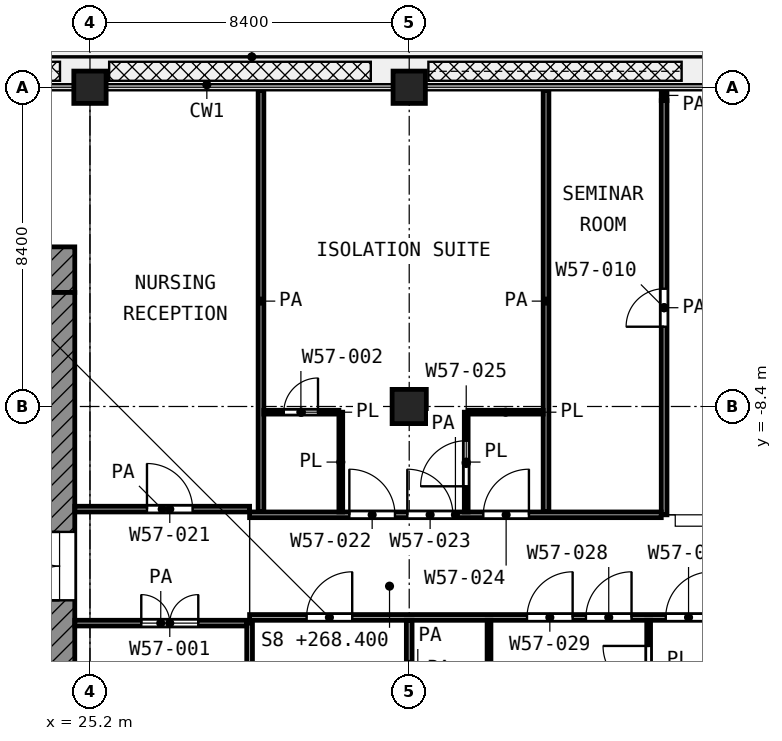
"""IFC4 building model, lengths in metres.
Left out: names, types, materials, properties, quantities, classifications, styles, units other than length and angle.
Written with IfcOpenShell. Run it as: python <this file> out.ifc"""

import sys

from ifc_helpers import new_model, si_unit, direction, frame, frame_2d, origin, origin_2d, place, context, subcontext, project, spatial, rectangle, extrude, element, fill, save


model = new_model("IFC4")
c1 = context("Model", 3, precision=1e-05, world=origin(), true_north=direction((0.0, 1.0)))
c2 = subcontext(c1, "Body", "Model", "MODEL_VIEW")
j1 = project(units=[si_unit("LENGTHUNIT", "METRE"), si_unit("PLANEANGLEUNIT", "RADIAN")], contexts=[c1])
p1 = place(None, origin())
s1 = spatial("IfcSite", under=j1, at=p1, CompositionType="ELEMENT")
p2 = place(p1, origin())
s2 = spatial("IfcBuilding", under=s1, at=p2, CompositionType="ELEMENT")
p3 = place(p2, frame((0.0, 0.0, 268.4)))
s3 = spatial("IfcBuildingStorey", under=s2, at=p3, CompositionType="ELEMENT", Elevation=268.4)
for number, where, z_axis, x_axis in (
    (1, (25.2, 0.0, 0.0), (0.0, 0.0, 1.0), (1.0, 0.0, 0.0)),
    (2, (33.6, 0.0, 0.0), (0.0, 0.0, 1.0), (1.0, 0.0, 0.0)),
):
    element("IfcColumn", number, at=place(p3, frame(where, z_axis=z_axis, x_axis=x_axis)), inside=s3, PredefinedType="COLUMN", context=c2, shape_type="SweptSolid", body=[
        extrude(rectangle(XDim=0.85, YDim=0.85, at=origin_2d()), origin(), (0.0, 0.0, 1.0), 4.2),
    ])
p4 = place(p3, frame((33.6, -8.4, 0.0), z_axis=(0.0, 0.0, 1.0), x_axis=(1.0, 0.0, 0.0)))
e3 = element("IfcColumn", 3, at=p4, inside=s3, PredefinedType="COLUMN", context=c2, shape_type="SweptSolid", body=[
    extrude(rectangle(XDim=0.9, YDim=0.9, at=origin_2d()), origin(), (0.0, 0.0, 1.0), 4.2),
])
p5 = place(p3, frame((4.2, -4.8, 0.0), z_axis=(0.0, 0.0, 1.0), x_axis=(1.0, 0.0, 0.0)))
e4 = element("IfcWall", 4, at=p5, inside=s3, PredefinedType="SHEAR", context=c2, shape_type="SweptSolid", body=[
    extrude(rectangle(XDim=20.6, YDim=1.2, at=frame_2d((10.3, 0.0))), origin(), (0.0, 0.0, 1.0), 3.7),
])
p6 = place(p5, frame((1.95, 0.0, 0.0)))
e5 = element("IfcOpeningElement", 5, at=p6, cuts=e4, PredefinedType="OPENING", context=c2, shape_type="SweptSolid", body=[
    extrude(rectangle(XDim=1.1, YDim=2.1, at=frame_2d((0.55, 1.05))), frame((0.0, 0.61, 0.0), z_axis=(0.0, -1.0, 0.0), x_axis=(1.0, 0.0, 0.0)), (0.0, 0.0, 1.0), 1.22),
])
p7 = place(p5, frame((17.95, 0.0, 0.0)))
e6 = element("IfcOpeningElement", 6, at=p7, cuts=e4, PredefinedType="OPENING", context=c2, shape_type="SweptSolid", body=[
    extrude(rectangle(XDim=1.1, YDim=2.1, at=frame_2d((0.55, 1.05))), frame((0.0, 0.61, 0.0), z_axis=(0.0, -1.0, 0.0), x_axis=(1.0, 0.0, 0.0)), (0.0, 0.0, 1.0), 1.22),
])
p8 = place(p3, frame((24.4, -24.0, 0.0), z_axis=(0.0, 0.0, 1.0), x_axis=(0.0, 1.0, 0.0)))
e7 = element("IfcWall", 7, at=p8, inside=s3, PredefinedType="SHEAR", context=c2, shape_type="SweptSolid", body=[
    extrude(rectangle(XDim=18.6, YDim=0.8, at=frame_2d((9.3, 0.0))), origin(), (0.0, 0.0, 1.0), 3.7),
])
p9 = place(p8, frame((10.5, 0.0, 0.0)))
e8 = element("IfcOpeningElement", 8, at=p9, cuts=e7, PredefinedType="OPENING", context=c2, shape_type="SweptSolid", body=[
    extrude(rectangle(XDim=1.8, YDim=2.1, at=frame_2d((0.9, 1.05))), frame((0.0, 0.41, 0.0), z_axis=(0.0, -1.0, 0.0), x_axis=(1.0, 0.0, 0.0)), (0.0, 0.0, 1.0), 0.82),
])
p10 = place(p3, frame((29.775, -8.55, 0.0), z_axis=(0.0, 0.0, 1.0), x_axis=(1.0, 0.0, 0.0)))
e9 = element("IfcWall", 9, at=p10, inside=s3, PredefinedType="PARTITIONING", context=c2, shape_type="SweptSolid", body=[
    extrude(rectangle(XDim=1.975, YDim=0.1, at=frame_2d((0.988, 0.0))), origin(), (0.0, 0.0, 1.0), 3.7),
])
p11 = place(p10, frame((0.525, 0.0, 0.0)))
e10 = element("IfcOpeningElement", 10, at=p11, cuts=e9, PredefinedType="OPENING", context=c2, shape_type="SweptSolid", body=[
    extrude(rectangle(XDim=0.9, YDim=2.1, at=frame_2d((0.45, 1.05))), frame((0.0, 0.06, 0.0), z_axis=(0.0, -1.0, 0.0), x_axis=(1.0, 0.0, 0.0)), (0.0, 0.0, 1.0), 0.12),
])
p12 = place(p3, frame((35.15, -8.55, 0.0), z_axis=(0.0, 0.0, 1.0), x_axis=(1.0, 0.0, 0.0)))
e11 = element("IfcWall", 11, at=p12, inside=s3, PredefinedType="PARTITIONING", context=c2, shape_type="SweptSolid", body=[
    extrude(rectangle(XDim=1.975, YDim=0.1, at=frame_2d((0.988, 0.0))), origin(), (0.0, 0.0, 1.0), 3.7),
])
p13 = place(p3, frame((31.8, -11.175, 0.0), z_axis=(0.0, 0.0, 1.0), x_axis=(0.0, 1.0, 0.0)))
e12 = element("IfcWall", 12, at=p13, inside=s3, PredefinedType="PARTITIONING", context=c2, shape_type="SweptSolid", body=[
    extrude(rectangle(XDim=2.625, YDim=0.1, at=frame_2d((1.312, 0.0))), origin(), (0.0, 0.0, 1.0), 3.7),
])
p14 = place(p3, frame((35.1, -11.175, 0.0), z_axis=(0.0, 0.0, 1.0), x_axis=(0.0, 1.0, 0.0)))
e13 = element("IfcWall", 13, at=p14, inside=s3, PredefinedType="PARTITIONING", context=c2, shape_type="SweptSolid", body=[
    extrude(rectangle(XDim=2.625, YDim=0.1, at=frame_2d((1.312, 0.0))), origin(), (0.0, 0.0, 1.0), 3.7),
])
p15 = place(p14, frame((0.675, 0.0, 0.0)))
e14 = element("IfcOpeningElement", 14, at=p15, cuts=e13, PredefinedType="OPENING", context=c2, shape_type="SweptSolid", body=[
    extrude(rectangle(XDim=1.2, YDim=2.1, at=frame_2d((0.6, 1.05))), frame((0.0, 0.06, 0.0), z_axis=(0.0, -1.0, 0.0), x_axis=(1.0, 0.0, 0.0)), (0.0, 0.0, 1.0), 0.12),
])
p16 = place(p3, frame((35.7, -16.65, 0.0), z_axis=(0.0, 0.0, 1.0), x_axis=(0.0, 1.0, 0.0)))
e15 = element("IfcWall", 15, at=p16, inside=s3, PredefinedType="PARTITIONING", context=c2, shape_type="SweptSolid", body=[
    extrude(rectangle(XDim=2.625, YDim=0.1, at=frame_2d((1.312, 0.0))), origin(), (0.0, 0.0, 1.0), 3.7),
])
p17 = place(p3, frame((39.9, -16.65, 0.0), z_axis=(0.0, 0.0, 1.0), x_axis=(0.0, 1.0, 0.0)))
e16 = element("IfcWall", 16, at=p17, inside=s3, PredefinedType="PARTITIONING", context=c2, shape_type="SweptSolid", body=[
    extrude(rectangle(XDim=2.625, YDim=0.1, at=frame_2d((1.312, 0.0))), origin(), (0.0, 0.0, 1.0), 3.7),
])
p18 = place(p17, frame((0.75, 0.0, 0.0)))
e17 = element("IfcOpeningElement", 17, at=p18, cuts=e16, PredefinedType="OPENING", context=c2, shape_type="SweptSolid", body=[
    extrude(rectangle(XDim=1.2, YDim=2.1, at=frame_2d((0.6, 1.05))), frame((0.0, 0.06, 0.0), z_axis=(0.0, -1.0, 0.0), x_axis=(1.0, 0.0, 0.0)), (0.0, 0.0, 1.0), 0.12),
])
p19 = place(p3, frame((24.8, -14.1, 0.0), z_axis=(0.0, 0.0, 1.0), x_axis=(1.0, 0.0, 0.0)))
e18 = element("IfcWall", 18, at=p19, inside=s3, PredefinedType="PARTITIONING", context=c2, shape_type="SweptSolid", body=[
    extrude(rectangle(XDim=4.525, YDim=0.15, at=frame_2d((2.262, 0.0))), origin(), (0.0, 0.0, 1.0), 3.7),
])
p20 = place(p19, frame((1.75, 0.0, 0.0)))
e19 = element("IfcOpeningElement", 19, at=p20, cuts=e18, PredefinedType="OPENING", context=c2, shape_type="SweptSolid", body=[
    extrude(rectangle(XDim=1.5, YDim=2.1, at=frame_2d((0.75, 1.05))), frame((0.0, 0.085, 0.0), z_axis=(0.0, -1.0, 0.0), x_axis=(1.0, 0.0, 0.0)), (0.0, 0.0, 1.0), 0.17),
])
p21 = place(p3, frame((29.4, -13.95, 0.0), z_axis=(0.0, 0.0, 1.0), x_axis=(1.0, 0.0, 0.0)))
e20 = element("IfcWall", 20, at=p21, inside=s3, PredefinedType="PARTITIONING", context=c2, shape_type="SweptSolid", body=[
    extrude(rectangle(XDim=33.52, YDim=0.15, at=frame_2d((16.76, 0.0))), origin(), (0.0, 0.0, 1.0), 3.7),
])
p22 = place(p21, frame((1.5, 0.0, 0.0)))
e21 = element("IfcOpeningElement", 21, at=p22, cuts=e20, PredefinedType="OPENING", context=c2, shape_type="SweptSolid", body=[
    extrude(rectangle(XDim=1.2, YDim=2.1, at=frame_2d((0.6, 1.05))), frame((0.0, 0.085, 0.0), z_axis=(0.0, -1.0, 0.0), x_axis=(1.0, 0.0, 0.0)), (0.0, 0.0, 1.0), 0.17),
])
p23 = place(p21, frame((8.85, 0.0, 0.0)))
e22 = element("IfcOpeningElement", 22, at=p23, cuts=e20, PredefinedType="OPENING", context=c2, shape_type="SweptSolid", body=[
    extrude(rectangle(XDim=1.2, YDim=2.1, at=frame_2d((0.6, 1.05))), frame((0.0, 0.085, 0.0), z_axis=(0.0, -1.0, 0.0), x_axis=(1.0, 0.0, 0.0)), (0.0, 0.0, 1.0), 0.17),
])
p24 = place(p21, frame((7.3, 0.0, 0.0)))
e23 = element("IfcOpeningElement", 23, at=p24, cuts=e20, PredefinedType="OPENING", context=c2, shape_type="SweptSolid", body=[
    extrude(rectangle(XDim=1.2, YDim=2.1, at=frame_2d((0.6, 1.05))), frame((0.0, 0.085, 0.0), z_axis=(0.0, -1.0, 0.0), x_axis=(1.0, 0.0, 0.0)), (0.0, 0.0, 1.0), 0.17),
])
p25 = place(p21, frame((10.95, 0.0, 0.0)))
e24 = element("IfcOpeningElement", 24, at=p25, cuts=e20, PredefinedType="OPENING", context=c2, shape_type="SweptSolid", body=[
    extrude(rectangle(XDim=1.2, YDim=2.1, at=frame_2d((0.6, 1.05))), frame((0.0, 0.085, 0.0), z_axis=(0.0, -1.0, 0.0), x_axis=(1.0, 0.0, 0.0)), (0.0, 0.0, 1.0), 0.17),
])
p26 = place(p21, frame((13.8, 0.0, 0.0)))
e25 = element("IfcOpeningElement", 25, at=p26, cuts=e20, PredefinedType="OPENING", context=c2, shape_type="SweptSolid", body=[
    extrude(rectangle(XDim=1.2, YDim=2.1, at=frame_2d((0.6, 1.05))), frame((0.0, 0.085, 0.0), z_axis=(0.0, -1.0, 0.0), x_axis=(1.0, 0.0, 0.0)), (0.0, 0.0, 1.0), 0.17),
])
p27 = place(p21, frame((19.7, 0.0, 0.0)))
e26 = element("IfcOpeningElement", 26, at=p27, cuts=e20, PredefinedType="OPENING", context=c2, shape_type="SweptSolid", body=[
    extrude(rectangle(XDim=1.1, YDim=2.1, at=frame_2d((0.55, 1.05))), frame((0.0, 0.085, 0.0), z_axis=(0.0, -1.0, 0.0), x_axis=(1.0, 0.0, 0.0)), (0.0, 0.0, 1.0), 0.17),
])
p28 = place(p21, frame((25.65, 0.0, 0.0)))
e27 = element("IfcOpeningElement", 27, at=p28, cuts=e20, PredefinedType="OPENING", context=c2, shape_type="SweptSolid", body=[
    extrude(rectangle(XDim=1.2, YDim=2.1, at=frame_2d((0.6, 1.05))), frame((0.0, 0.085, 0.0), z_axis=(0.0, -1.0, 0.0), x_axis=(1.0, 0.0, 0.0)), (0.0, 0.0, 1.0), 0.17),
])
p29 = place(p21, frame((24.1, 0.0, 0.0)))
e28 = element("IfcOpeningElement", 28, at=p29, cuts=e20, PredefinedType="OPENING", context=c2, shape_type="SweptSolid", body=[
    extrude(rectangle(XDim=1.2, YDim=2.1, at=frame_2d((0.6, 1.05))), frame((0.0, 0.085, 0.0), z_axis=(0.0, -1.0, 0.0), x_axis=(1.0, 0.0, 0.0)), (0.0, 0.0, 1.0), 0.17),
])
p30 = place(p21, frame((27.75, 0.0, 0.0)))
e29 = element("IfcOpeningElement", 29, at=p30, cuts=e20, PredefinedType="OPENING", context=c2, shape_type="SweptSolid", body=[
    extrude(rectangle(XDim=1.2, YDim=2.1, at=frame_2d((0.6, 1.05))), frame((0.0, 0.085, 0.0), z_axis=(0.0, -1.0, 0.0), x_axis=(1.0, 0.0, 0.0)), (0.0, 0.0, 1.0), 0.17),
])
p31 = place(p21, frame((31.0, 0.0, 0.0)))
e30 = element("IfcOpeningElement", 30, at=p31, cuts=e20, PredefinedType="OPENING", context=c2, shape_type="SweptSolid", body=[
    extrude(rectangle(XDim=1.0, YDim=2.1, at=frame_2d((0.5, 1.05))), frame((0.0, 0.085, 0.0), z_axis=(0.0, -1.0, 0.0), x_axis=(1.0, 0.0, 0.0)), (0.0, 0.0, 1.0), 0.17),
])
p32 = place(p3, frame((29.4, -11.25, 0.0), z_axis=(0.0, 0.0, 1.0), x_axis=(1.0, 0.0, 0.0)))
e31 = element("IfcWall", 31, at=p32, inside=s3, PredefinedType="PARTITIONING", context=c2, shape_type="SweptSolid", body=[
    extrude(rectangle(XDim=10.832, YDim=0.15, at=frame_2d((5.416, 0.0))), origin(), (0.0, 0.0, 1.0), 3.7),
])
p33 = place(p32, frame((2.625, 0.0, 0.0)))
e32 = element("IfcOpeningElement", 32, at=p33, cuts=e31, PredefinedType="OPENING", context=c2, shape_type="SweptSolid", body=[
    extrude(rectangle(XDim=1.2, YDim=2.1, at=frame_2d((0.6, 1.05))), frame((0.0, 0.085, 0.0), z_axis=(0.0, -1.0, 0.0), x_axis=(1.0, 0.0, 0.0)), (0.0, 0.0, 1.0), 0.17),
])
p34 = place(p32, frame((4.15, 0.0, 0.0)))
e33 = element("IfcOpeningElement", 33, at=p34, cuts=e31, PredefinedType="OPENING", context=c2, shape_type="SweptSolid", body=[
    extrude(rectangle(XDim=1.2, YDim=2.1, at=frame_2d((0.6, 1.05))), frame((0.0, 0.085, 0.0), z_axis=(0.0, -1.0, 0.0), x_axis=(1.0, 0.0, 0.0)), (0.0, 0.0, 1.0), 0.17),
])
p35 = place(p32, frame((6.15, 0.0, 0.0)))
e34 = element("IfcOpeningElement", 34, at=p35, cuts=e31, PredefinedType="OPENING", context=c2, shape_type="SweptSolid", body=[
    extrude(rectangle(XDim=1.2, YDim=2.1, at=frame_2d((0.6, 1.05))), frame((0.0, 0.085, 0.0), z_axis=(0.0, -1.0, 0.0), x_axis=(1.0, 0.0, 0.0)), (0.0, 0.0, 1.0), 0.17),
])
p36 = place(p3, frame((24.8, -11.1, 0.0), z_axis=(0.0, 0.0, 1.0), x_axis=(1.0, 0.0, 0.0)))
e35 = element("IfcWall", 35, at=p36, inside=s3, PredefinedType="PARTITIONING", context=c2, shape_type="SweptSolid", body=[
    extrude(rectangle(XDim=4.6, YDim=0.15, at=frame_2d((2.3, 0.0))), origin(), (0.0, 0.0, 1.0), 3.7),
])
p37 = place(p36, frame((1.9, 0.0, 0.0)))
e36 = element("IfcOpeningElement", 36, at=p37, cuts=e35, PredefinedType="OPENING", context=c2, shape_type="SweptSolid", body=[
    extrude(rectangle(XDim=1.2, YDim=2.1, at=frame_2d((0.6, 1.05))), frame((0.0, 0.085, 0.0), z_axis=(0.0, -1.0, 0.0), x_axis=(1.0, 0.0, 0.0)), (0.0, 0.0, 1.0), 0.17),
])
p38 = place(p3, frame((29.4, -25.2, 0.0), z_axis=(0.0, 0.0, 1.0), x_axis=(0.0, 1.0, 0.0)))
e37 = element("IfcWall", 37, at=p38, inside=s3, PredefinedType="PARTITIONING", context=c2, shape_type="SweptSolid", body=[
    extrude(rectangle(XDim=11.1, YDim=0.15, at=frame_2d((5.55, 0.0))), origin(), (0.0, 0.0, 1.0), 3.7),
])
p39 = place(p3, frame((29.7, -11.175, 0.0), z_axis=(0.0, 0.0, 1.0), x_axis=(0.0, 1.0, 0.0)))
e38 = element("IfcWall", 38, at=p39, inside=s3, PredefinedType="PARTITIONING", context=c2, shape_type="SweptSolid", body=[
    extrude(rectangle(XDim=11.095, YDim=0.15, at=frame_2d((5.547, 0.0))), origin(), (0.0, 0.0, 1.0), 3.7),
])
p40 = place(p3, frame((33.6, -16.348, 0.0), z_axis=(0.0, 0.0, 1.0), x_axis=(0.0, 1.0, 0.0)))
e39 = element("IfcWall", 39, at=p40, inside=s3, PredefinedType="PARTITIONING", context=c2, shape_type="SweptSolid", body=[
    extrude(rectangle(XDim=2.323, YDim=0.15, at=frame_2d((1.162, 0.0))), origin(), (0.0, 0.0, 1.0), 3.7),
])
p41 = place(p3, frame((37.2, -11.175, 0.0), z_axis=(0.0, 0.0, 1.0), x_axis=(0.0, 1.0, 0.0)))
e40 = element("IfcWall", 40, at=p41, inside=s3, PredefinedType="PARTITIONING", context=c2, shape_type="SweptSolid", body=[
    extrude(rectangle(XDim=11.095, YDim=0.15, at=frame_2d((5.547, 0.0))), origin(), (0.0, 0.0, 1.0), 3.7),
])
p42 = place(p3, frame((40.307, -11.25, 0.0), z_axis=(0.0, 0.0, 1.0), x_axis=(0.0, 1.0, 0.0)))
e41 = element("IfcWall", 41, at=p42, inside=s3, PredefinedType="PARTITIONING", context=c2, shape_type="SweptSolid", body=[
    extrude(rectangle(XDim=10.898, YDim=0.15, at=frame_2d((5.449, 0.0))), origin(), (0.0, 0.0, 1.0), 3.7),
])
p43 = place(p42, frame((4.949, 0.0, 0.0)))
e42 = element("IfcOpeningElement", 42, at=p43, cuts=e41, PredefinedType="OPENING", context=c2, shape_type="SweptSolid", body=[
    extrude(rectangle(XDim=1.0, YDim=2.1, at=frame_2d((0.5, 1.05))), frame((0.0, 0.085, 0.0), z_axis=(0.0, -1.0, 0.0), x_axis=(1.0, 0.0, 0.0)), (0.0, 0.0, 1.0), 0.17),
])
p44 = place(p3, frame((40.307, -0.35, 0.0), z_axis=(0.0, 0.0, 1.0), x_axis=(0.0, 1.0, 0.0)))
e43 = element("IfcWall", 43, at=p44, inside=s3, PredefinedType="PARTITIONING", context=c2, shape_type="SweptSolid", body=[
    extrude(rectangle(XDim=0.27, YDim=0.15, at=frame_2d((0.135, 0.0))), origin(), (0.0, 0.0, 1.0), 3.7),
])
p45 = place(p9, origin())
e44 = element("IfcDoor", 44, at=p45, inside=s3, OperationType="DOUBLE_DOOR_SINGLE_SWING", PredefinedType="DOOR", context=c2, shape_type="SweptSolid", body=[
    extrude(rectangle(XDim=1.8, YDim=2.1, at=frame_2d((0.9, 1.05))), frame((0.0, 0.025, 0.0), z_axis=(0.0, -1.0, 0.0), x_axis=(1.0, 0.0, 0.0)), (0.0, 0.0, 1.0), 0.05),
])
fill(e8, e44)
p46 = place(p20, origin())
e45 = element("IfcDoor", 45, at=p46, inside=s3, OperationType="DOUBLE_DOOR_SINGLE_SWING", PredefinedType="DOOR", context=c2, shape_type="SweptSolid", body=[
    extrude(rectangle(XDim=1.5, YDim=2.1, at=frame_2d((0.75, 1.05))), frame((0.0, 0.025, 0.0), z_axis=(0.0, -1.0, 0.0), x_axis=(1.0, 0.0, 0.0)), (0.0, 0.0, 1.0), 0.05),
])
fill(e19, e45)
p47 = place(p37, origin())
e46 = element("IfcDoor", 46, at=p47, inside=s3, OperationType="SINGLE_SWING_LEFT", PredefinedType="DOOR", context=c2, shape_type="SweptSolid", body=[
    extrude(rectangle(XDim=1.2, YDim=2.1, at=frame_2d((0.6, 1.05))), frame((0.0, 0.025, 0.0), z_axis=(0.0, -1.0, 0.0), x_axis=(1.0, 0.0, 0.0)), (0.0, 0.0, 1.0), 0.05),
])
fill(e36, e46)
p48 = place(p33, origin())
e47 = element("IfcDoor", 47, at=p48, inside=s3, OperationType="SINGLE_SWING_LEFT", PredefinedType="DOOR", context=c2, shape_type="SweptSolid", body=[
    extrude(rectangle(XDim=1.2, YDim=2.1, at=frame_2d((0.6, 1.05))), frame((0.0, 0.025, 0.0), z_axis=(0.0, -1.0, 0.0), x_axis=(1.0, 0.0, 0.0)), (0.0, 0.0, 1.0), 0.05),
])
fill(e32, e47)
p49 = place(p34, origin())
e48 = element("IfcDoor", 48, at=p49, inside=s3, OperationType="SINGLE_SWING_LEFT", PredefinedType="DOOR", context=c2, shape_type="SweptSolid", body=[
    extrude(rectangle(XDim=1.2, YDim=2.1, at=frame_2d((0.6, 1.05))), frame((0.0, 0.025, 0.0), z_axis=(0.0, -1.0, 0.0), x_axis=(1.0, 0.0, 0.0)), (0.0, 0.0, 1.0), 0.05),
])
fill(e33, e48)
p50 = place(p35, origin())
e49 = element("IfcDoor", 49, at=p50, inside=s3, OperationType="SINGLE_SWING_RIGHT", PredefinedType="DOOR", context=c2, shape_type="SweptSolid", body=[
    extrude(rectangle(XDim=1.2, YDim=2.1, at=frame_2d((0.6, 1.05))), frame((0.0, 0.025, 0.0), z_axis=(0.0, -1.0, 0.0), x_axis=(1.0, 0.0, 0.0)), (0.0, 0.0, 1.0), 0.05),
])
fill(e34, e49)
p51 = place(p15, origin())
e50 = element("IfcDoor", 50, at=p51, inside=s3, OperationType="SINGLE_SWING_LEFT", PredefinedType="DOOR", context=c2, shape_type="SweptSolid", body=[
    extrude(rectangle(XDim=1.2, YDim=2.1, at=frame_2d((0.6, 1.05))), frame((0.0, 0.025, 0.0), z_axis=(0.0, -1.0, 0.0), x_axis=(1.0, 0.0, 0.0)), (0.0, 0.0, 1.0), 0.05),
])
fill(e14, e50)
p52 = place(p11, origin())
e51 = element("IfcDoor", 51, at=p52, inside=s3, OperationType="SINGLE_SWING_RIGHT", PredefinedType="DOOR", context=c2, shape_type="SweptSolid", body=[
    extrude(rectangle(XDim=0.9, YDim=2.1, at=frame_2d((0.45, 1.05))), frame((0.0, 0.025, 0.0), z_axis=(0.0, -1.0, 0.0), x_axis=(1.0, 0.0, 0.0)), (0.0, 0.0, 1.0), 0.05),
])
fill(e10, e51)
p53 = place(p43, origin())
e52 = element("IfcDoor", 52, at=p53, inside=s3, OperationType="SINGLE_SWING_LEFT", PredefinedType="DOOR", context=c2, shape_type="SweptSolid", body=[
    extrude(rectangle(XDim=1.0, YDim=2.1, at=frame_2d((0.5, 1.05))), frame((0.0, 0.025, 0.0), z_axis=(0.0, -1.0, 0.0), x_axis=(1.0, 0.0, 0.0)), (0.0, 0.0, 1.0), 0.05),
])
fill(e42, e52)
p54 = place(p22, origin())
e53 = element("IfcDoor", 53, at=p54, inside=s3, OperationType="SINGLE_SWING_RIGHT", PredefinedType="DOOR", context=c2, shape_type="SweptSolid", body=[
    extrude(rectangle(XDim=1.2, YDim=2.1, at=frame_2d((0.6, 1.05))), frame((0.0, 0.025, 0.0), z_axis=(0.0, -1.0, 0.0), x_axis=(1.0, 0.0, 0.0)), (0.0, 0.0, 1.0), 0.05),
])
fill(e21, e53)
p55 = place(p23, origin())
e54 = element("IfcDoor", 54, at=p55, inside=s3, OperationType="SINGLE_SWING_RIGHT", PredefinedType="DOOR", context=c2, shape_type="SweptSolid", body=[
    extrude(rectangle(XDim=1.2, YDim=2.1, at=frame_2d((0.6, 1.05))), frame((0.0, 0.025, 0.0), z_axis=(0.0, -1.0, 0.0), x_axis=(1.0, 0.0, 0.0)), (0.0, 0.0, 1.0), 0.05),
])
fill(e22, e54)
p56 = place(p24, origin())
e55 = element("IfcDoor", 55, at=p56, inside=s3, OperationType="SINGLE_SWING_RIGHT", PredefinedType="DOOR", context=c2, shape_type="SweptSolid", body=[
    extrude(rectangle(XDim=1.2, YDim=2.1, at=frame_2d((0.6, 1.05))), frame((0.0, 0.025, 0.0), z_axis=(0.0, -1.0, 0.0), x_axis=(1.0, 0.0, 0.0)), (0.0, 0.0, 1.0), 0.05),
])
fill(e23, e55)
p57 = place(p25, origin())
e56 = element("IfcDoor", 56, at=p57, inside=s3, OperationType="SINGLE_SWING_RIGHT", PredefinedType="DOOR", context=c2, shape_type="SweptSolid", body=[
    extrude(rectangle(XDim=1.2, YDim=2.1, at=frame_2d((0.6, 1.05))), frame((0.0, 0.025, 0.0), z_axis=(0.0, -1.0, 0.0), x_axis=(1.0, 0.0, 0.0)), (0.0, 0.0, 1.0), 0.05),
])
fill(e24, e56)
p58 = place(p18, origin())
e57 = element("IfcDoor", 57, at=p58, inside=s3, OperationType="SINGLE_SWING_RIGHT", PredefinedType="DOOR", context=c2, shape_type="SweptSolid", body=[
    extrude(rectangle(XDim=1.2, YDim=2.1, at=frame_2d((0.6, 1.05))), frame((0.0, 0.025, 0.0), z_axis=(0.0, -1.0, 0.0), x_axis=(1.0, 0.0, 0.0)), (0.0, 0.0, 1.0), 0.05),
])
fill(e17, e57)
save(model, sys.argv[1])
